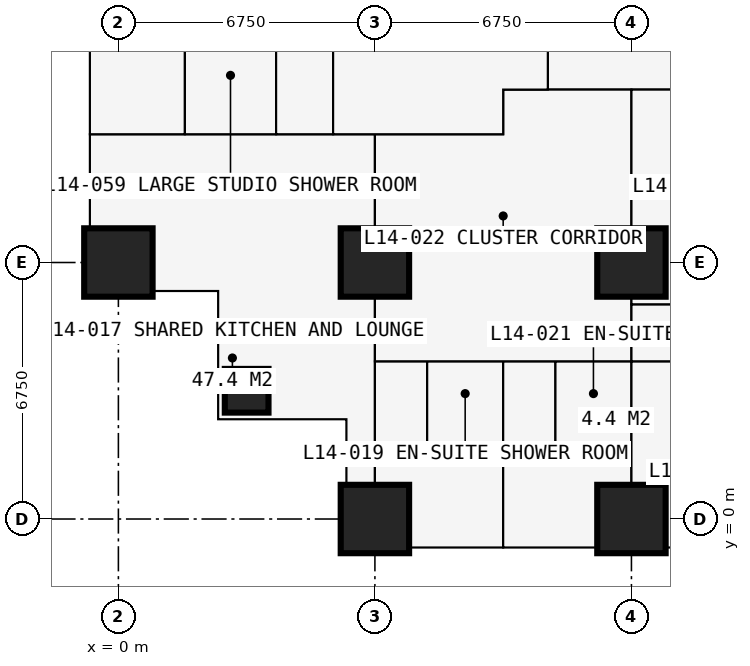
"""IFC4 building model, lengths in metres.
Left out: names, types, materials, properties, quantities, classifications, styles, units other than length and angle.
Written with IfcOpenShell. Run it as: python <this file> out.ifc"""

import sys

from ifc_helpers import new_model, si_unit, direction, frame, frame_2d, origin, origin_2d, place, context, subcontext, project, spatial, rectangle, extrude, element, fill, save


model = new_model("IFC4")
c1 = context("Model", 3, precision=1e-05, world=origin(), true_north=direction((0.0, 1.0)))
c2 = subcontext(c1, "Body", "Model", "MODEL_VIEW")
j1 = project(units=[si_unit("LENGTHUNIT", "METRE"), si_unit("PLANEANGLEUNIT", "RADIAN")], contexts=[c1])
p1 = place(None, origin())
s1 = spatial("IfcSite", under=j1, at=p1, CompositionType="ELEMENT")
p2 = place(p1, origin())
s2 = spatial("IfcBuilding", under=s1, at=p2, CompositionType="ELEMENT")
p3 = place(p2, frame((0.0, 0.0, 54.0)))
s3 = spatial("IfcBuildingStorey", under=s2, at=p3, CompositionType="ELEMENT", Elevation=54.0)
p4 = place(p3, frame((0.0, 6.75, 0.0), z_axis=(0.0, 0.0, 1.0), x_axis=(1.0, 0.0, 0.0)))
e1 = element("IfcColumn", 1, at=p4, inside=s3, PredefinedType="COLUMN", context=c2, shape_type="SweptSolid", body=[
    extrude(rectangle(XDim=1.8, YDim=1.8, at=origin_2d()), origin(), (0.0, 0.0, 1.0), 3.6),
])
p5 = place(p3, frame((3.375, 3.375, 0.0), z_axis=(0.0, 0.0, 1.0), x_axis=(1.0, 0.0, 0.0)))
e2 = element("IfcColumn", 2, at=p5, inside=s3, PredefinedType="COLUMN", context=c2, shape_type="SweptSolid", body=[
    extrude(rectangle(XDim=1.15, YDim=1.15, at=origin_2d()), origin(), (0.0, 0.0, 1.0), 3.6),
])
for number, where, z_axis, x_axis in (
    (3, (6.75, 0.0, 0.0), (0.0, 0.0, 1.0), (1.0, 0.0, 0.0)),
    (4, (6.75, 6.75, 0.0), (0.0, 0.0, 1.0), (1.0, 0.0, 0.0)),
    (5, (13.5, 0.0, 0.0), (0.0, 0.0, 1.0), (1.0, 0.0, 0.0)),
    (6, (13.5, 6.75, 0.0), (0.0, 0.0, 1.0), (1.0, 0.0, 0.0)),
):
    element("IfcColumn", number, at=place(p3, frame(where, z_axis=z_axis, x_axis=x_axis)), inside=s3, PredefinedType="COLUMN", context=c2, shape_type="SweptSolid", body=[
        extrude(rectangle(XDim=1.8, YDim=1.8, at=origin_2d()), origin(), (0.0, 0.0, 1.0), 3.6),
    ])
p6 = place(p3, frame((-0.75, 6.0, 0.0), z_axis=(0.0, 0.0, 1.0), x_axis=(1.0, 0.0, 0.0)))
e7 = element("IfcWall", 7, at=p6, inside=s3, PredefinedType="SOLIDWALL", context=c2, shape_type="SweptSolid", body=[
    extrude(rectangle(XDim=3.375, YDim=0.3, at=frame_2d((1.688, 0.0))), origin(), (0.0, 0.0, 1.0), 3.375),
])
p7 = place(p6, frame((1.833, 0.0, 0.9)))
e8 = element("IfcOpeningElement", 8, at=p7, cuts=e7, PredefinedType="OPENING", context=c2, shape_type="SweptSolid", body=[
    extrude(rectangle(XDim=1.2, YDim=1.8, at=frame_2d((0.6, 0.9))), frame((0.0, 0.16, 0.0), z_axis=(0.0, -1.0, 0.0), x_axis=(1.0, 0.0, 0.0)), (0.0, 0.0, 1.0), 0.32),
])
p8 = place(p3, frame((2.625, 6.0, 0.0), z_axis=(0.0, 0.0, 1.0), x_axis=(0.0, -1.0, 0.0)))
e9 = element("IfcWall", 9, at=p8, inside=s3, PredefinedType="SOLIDWALL", context=c2, shape_type="SweptSolid", body=[
    extrude(rectangle(XDim=3.375, YDim=0.3, at=frame_2d((1.688, 0.0))), origin(), (0.0, 0.0, 1.0), 3.375),
])
p9 = place(p8, frame((0.788, 0.0, 0.6)))
e10 = element("IfcOpeningElement", 10, at=p9, cuts=e9, PredefinedType="OPENING", context=c2, shape_type="SweptSolid", body=[
    extrude(rectangle(XDim=1.8, YDim=2.1, at=frame_2d((0.9, 1.05))), frame((0.0, 0.16, 0.0), z_axis=(0.0, -1.0, 0.0), x_axis=(1.0, 0.0, 0.0)), (0.0, 0.0, 1.0), 0.32),
])
p10 = place(p3, frame((2.625, 2.625, 0.0), z_axis=(0.0, 0.0, 1.0), x_axis=(1.0, 0.0, 0.0)))
e11 = element("IfcWall", 11, at=p10, inside=s3, PredefinedType="SOLIDWALL", context=c2, shape_type="SweptSolid", body=[
    extrude(rectangle(XDim=3.375, YDim=0.3, at=frame_2d((1.688, 0.0))), origin(), (0.0, 0.0, 1.0), 3.375),
])
p11 = place(p10, frame((0.788, 0.0, 0.6)))
e12 = element("IfcOpeningElement", 12, at=p11, cuts=e11, PredefinedType="OPENING", context=c2, shape_type="SweptSolid", body=[
    extrude(rectangle(XDim=1.8, YDim=2.1, at=frame_2d((0.9, 1.05))), frame((0.0, 0.16, 0.0), z_axis=(0.0, -1.0, 0.0), x_axis=(1.0, 0.0, 0.0)), (0.0, 0.0, 1.0), 0.32),
])
p12 = place(p3, frame((6.0, 2.625, 0.0), z_axis=(0.0, 0.0, 1.0), x_axis=(0.0, -1.0, 0.0)))
e13 = element("IfcWall", 13, at=p12, inside=s3, PredefinedType="SOLIDWALL", context=c2, shape_type="SweptSolid", body=[
    extrude(rectangle(XDim=3.375, YDim=0.3, at=frame_2d((1.688, 0.0))), origin(), (0.0, 0.0, 1.0), 3.375),
])
p13 = place(p12, frame((0.343, 0.0, 0.9)))
e14 = element("IfcOpeningElement", 14, at=p13, cuts=e13, PredefinedType="OPENING", context=c2, shape_type="SweptSolid", body=[
    extrude(rectangle(XDim=1.2, YDim=1.8, at=frame_2d((0.6, 0.9))), frame((0.0, 0.16, 0.0), z_axis=(0.0, -1.0, 0.0), x_axis=(1.0, 0.0, 0.0)), (0.0, 0.0, 1.0), 0.32),
])
p14 = place(p3, frame((20.25, -0.75, 0.0), z_axis=(0.0, 0.0, 1.0), x_axis=(-1.0, 0.0, 0.0)))
e15 = element("IfcWall", 15, at=p14, inside=s3, PredefinedType="SOLIDWALL", context=c2, shape_type="SweptSolid", body=[
    extrude(rectangle(XDim=6.75, YDim=0.15, at=frame_2d((3.375, 0.0))), origin(), (0.0, 0.0, 1.0), 3.375),
])
p15 = place(p14, frame((0.962, 0.0, 0.0)))
e16 = element("IfcOpeningElement", 16, at=p15, cuts=e15, PredefinedType="OPENING", context=c2, shape_type="SweptSolid", body=[
    extrude(rectangle(XDim=1.0, YDim=2.2, at=frame_2d((0.5, 1.1))), frame((0.0, 0.085, 0.0), z_axis=(0.0, -1.0, 0.0), x_axis=(1.0, 0.0, 0.0)), (0.0, 0.0, 1.0), 0.17),
])
p16 = place(p14, frame((2.025, 0.0, 0.9)))
e17 = element("IfcOpeningElement", 17, at=p16, cuts=e15, PredefinedType="OPENING", context=c2, shape_type="SweptSolid", body=[
    extrude(rectangle(XDim=1.2, YDim=1.8, at=frame_2d((0.6, 0.9))), frame((0.0, 0.085, 0.0), z_axis=(0.0, -1.0, 0.0), x_axis=(1.0, 0.0, 0.0)), (0.0, 0.0, 1.0), 0.17),
])
p17 = place(p14, frame((4.788, 0.0, 0.0)))
e18 = element("IfcOpeningElement", 18, at=p17, cuts=e15, PredefinedType="OPENING", context=c2, shape_type="SweptSolid", body=[
    extrude(rectangle(XDim=1.0, YDim=2.2, at=frame_2d((0.5, 1.1))), frame((0.0, 0.085, 0.0), z_axis=(0.0, -1.0, 0.0), x_axis=(1.0, 0.0, 0.0)), (0.0, 0.0, 1.0), 0.17),
])
p18 = place(p14, frame((3.525, 0.0, 0.9)))
e19 = element("IfcOpeningElement", 19, at=p18, cuts=e15, PredefinedType="OPENING", context=c2, shape_type="SweptSolid", body=[
    extrude(rectangle(XDim=1.2, YDim=1.8, at=frame_2d((0.6, 0.9))), frame((0.0, 0.085, 0.0), z_axis=(0.0, -1.0, 0.0), x_axis=(1.0, 0.0, 0.0)), (0.0, 0.0, 1.0), 0.17),
])
p19 = place(p3, frame((-0.734, 10.125, 0.0), z_axis=(0.0, 0.0, 1.0), x_axis=(1.0, 0.0, 0.0)))
e20 = element("IfcWall", 20, at=p19, inside=s3, PredefinedType="PARTITIONING", context=c2, shape_type="SweptSolid", body=[
    extrude(rectangle(XDim=10.859, YDim=0.15, at=frame_2d((5.429, 0.0))), origin(), (0.0, 0.0, 1.0), 3.375),
])
p20 = place(p19, frame((5.134, 0.0, 0.0)))
e21 = element("IfcOpeningElement", 21, at=p20, cuts=e20, PredefinedType="OPENING", context=c2, shape_type="SweptSolid", body=[
    extrude(rectangle(XDim=1.0, YDim=2.2, at=frame_2d((0.5, 1.1))), frame((0.0, 0.085, 0.0), z_axis=(0.0, -1.0, 0.0), x_axis=(1.0, 0.0, 0.0)), (0.0, 0.0, 1.0), 0.17),
])
p21 = place(p3, frame((1.75, 10.125, 0.0), z_axis=(0.0, 0.0, 1.0), x_axis=(0.0, 1.0, 0.0)))
e22 = element("IfcWall", 22, at=p21, inside=s3, PredefinedType="PARTITIONING", context=c2, shape_type="SweptSolid", body=[
    extrude(rectangle(XDim=2.6, YDim=0.1, at=frame_2d((1.3, 0.0))), origin(), (0.0, 0.0, 1.0), 3.375),
])
p22 = place(p21, frame((0.85, 0.0, 0.0)))
e23 = element("IfcOpeningElement", 23, at=p22, cuts=e22, PredefinedType="OPENING", context=c2, shape_type="SweptSolid", body=[
    extrude(rectangle(XDim=0.9, YDim=2.2, at=frame_2d((0.45, 1.1))), frame((0.0, 0.06, 0.0), z_axis=(0.0, -1.0, 0.0), x_axis=(1.0, 0.0, 0.0)), (0.0, 0.0, 1.0), 0.12),
])
p23 = place(p3, frame((4.15, 10.125, 0.0), z_axis=(0.0, 0.0, 1.0), x_axis=(0.0, 1.0, 0.0)))
e24 = element("IfcWall", 24, at=p23, inside=s3, PredefinedType="PARTITIONING", context=c2, shape_type="SweptSolid", body=[
    extrude(rectangle(XDim=23.625, YDim=0.15, at=frame_2d((11.812, 0.0))), origin(), (0.0, 0.0, 1.0), 3.375),
])
p24 = place(p23, frame((4.2, 0.0, 0.0)))
e25 = element("IfcOpeningElement", 25, at=p24, cuts=e24, PredefinedType="OPENING", context=c2, shape_type="SweptSolid", body=[
    extrude(rectangle(XDim=0.95, YDim=2.2, at=frame_2d((0.475, 1.1))), frame((0.0, 0.085, 0.0), z_axis=(0.0, -1.0, 0.0), x_axis=(1.0, 0.0, 0.0)), (0.0, 0.0, 1.0), 0.17),
])
p25 = place(p23, frame((10.95, 0.0, 0.0)))
e26 = element("IfcOpeningElement", 26, at=p25, cuts=e24, PredefinedType="OPENING", context=c2, shape_type="SweptSolid", body=[
    extrude(rectangle(XDim=0.95, YDim=2.2, at=frame_2d((0.475, 1.1))), frame((0.0, 0.085, 0.0), z_axis=(0.0, -1.0, 0.0), x_axis=(1.0, 0.0, 0.0)), (0.0, 0.0, 1.0), 0.17),
])
p26 = place(p23, frame((17.7, 0.0, 0.0)))
e27 = element("IfcOpeningElement", 27, at=p26, cuts=e24, PredefinedType="OPENING", context=c2, shape_type="SweptSolid", body=[
    extrude(rectangle(XDim=0.95, YDim=2.2, at=frame_2d((0.475, 1.1))), frame((0.0, 0.085, 0.0), z_axis=(0.0, -1.0, 0.0), x_axis=(1.0, 0.0, 0.0)), (0.0, 0.0, 1.0), 0.17),
])
p27 = place(p3, frame((5.65, 10.125, 0.0), z_axis=(0.0, 0.0, 1.0), x_axis=(0.0, 1.0, 0.0)))
e28 = element("IfcWall", 28, at=p27, inside=s3, PredefinedType="PARTITIONING", context=c2, shape_type="SweptSolid", body=[
    extrude(rectangle(XDim=10.762, YDim=0.15, at=frame_2d((5.381, 0.0))), origin(), (0.0, 0.0, 1.0), 3.375),
])
p28 = place(p27, frame((4.9, 0.0, 0.0)))
e29 = element("IfcOpeningElement", 29, at=p28, cuts=e28, PredefinedType="OPENING", context=c2, shape_type="SweptSolid", body=[
    extrude(rectangle(XDim=0.95, YDim=2.2, at=frame_2d((0.475, 1.1))), frame((0.0, 0.085, 0.0), z_axis=(0.0, -1.0, 0.0), x_axis=(1.0, 0.0, 0.0)), (0.0, 0.0, 1.0), 0.17),
])
p29 = place(p3, frame((6.75, -0.734, 0.0), z_axis=(0.0, 0.0, 1.0), x_axis=(0.0, 1.0, 0.0)))
e30 = element("IfcWall", 30, at=p29, inside=s3, PredefinedType="PARTITIONING", context=c2, shape_type="SweptSolid", body=[
    extrude(rectangle(XDim=10.859, YDim=0.15, at=frame_2d((5.429, 0.0))), origin(), (0.0, 0.0, 1.0), 2.877),
])
p30 = place(p3, frame((6.75, 4.15, 0.0), z_axis=(0.0, 0.0, 1.0), x_axis=(1.0, 0.0, 0.0)))
e31 = element("IfcWall", 31, at=p30, inside=s3, PredefinedType="PARTITIONING", context=c2, shape_type="SweptSolid", body=[
    extrude(rectangle(XDim=23.625, YDim=0.15, at=frame_2d((11.812, 0.0))), origin(), (0.0, 0.0, 1.0), 3.375),
])
p31 = place(p30, frame((0.2, 0.0, 0.0)))
e32 = element("IfcOpeningElement", 32, at=p31, cuts=e31, PredefinedType="OPENING", context=c2, shape_type="SweptSolid", body=[
    extrude(rectangle(XDim=0.95, YDim=2.2, at=frame_2d((0.475, 1.1))), frame((0.0, 0.085, 0.0), z_axis=(0.0, -1.0, 0.0), x_axis=(1.0, 0.0, 0.0)), (0.0, 0.0, 1.0), 0.17),
])
p32 = place(p30, frame((3.625, 0.0, 0.0)))
e33 = element("IfcOpeningElement", 33, at=p32, cuts=e31, PredefinedType="OPENING", context=c2, shape_type="SweptSolid", body=[
    extrude(rectangle(XDim=0.95, YDim=2.2, at=frame_2d((0.475, 1.1))), frame((0.0, 0.085, 0.0), z_axis=(0.0, -1.0, 0.0), x_axis=(1.0, 0.0, 0.0)), (0.0, 0.0, 1.0), 0.17),
])
p33 = place(p30, frame((18.475, 0.0, 0.0)))
e34 = element("IfcOpeningElement", 34, at=p33, cuts=e31, PredefinedType="OPENING", context=c2, shape_type="SweptSolid", body=[
    extrude(rectangle(XDim=0.95, YDim=2.2, at=frame_2d((0.475, 1.1))), frame((0.0, 0.085, 0.0), z_axis=(0.0, -1.0, 0.0), x_axis=(1.0, 0.0, 0.0)), (0.0, 0.0, 1.0), 0.17),
])
p34 = place(p30, frame((11.725, 0.0, 0.0)))
e35 = element("IfcOpeningElement", 35, at=p34, cuts=e31, PredefinedType="OPENING", context=c2, shape_type="SweptSolid", body=[
    extrude(rectangle(XDim=0.95, YDim=2.2, at=frame_2d((0.475, 1.1))), frame((0.0, 0.085, 0.0), z_axis=(0.0, -1.0, 0.0), x_axis=(1.0, 0.0, 0.0)), (0.0, 0.0, 1.0), 0.17),
])
p35 = place(p30, frame((6.95, 0.0, 0.0)))
e36 = element("IfcOpeningElement", 36, at=p35, cuts=e31, PredefinedType="OPENING", context=c2, shape_type="SweptSolid", body=[
    extrude(rectangle(XDim=0.95, YDim=2.2, at=frame_2d((0.475, 1.1))), frame((0.0, 0.085, 0.0), z_axis=(0.0, -1.0, 0.0), x_axis=(1.0, 0.0, 0.0)), (0.0, 0.0, 1.0), 0.17),
])
p36 = place(p3, frame((8.125, 1.95, 0.0), z_axis=(0.0, 0.0, 1.0), x_axis=(0.0, 1.0, 0.0)))
e37 = element("IfcWall", 37, at=p36, inside=s3, PredefinedType="PARTITIONING", context=c2, shape_type="SweptSolid", body=[
    extrude(rectangle(XDim=2.2, YDim=0.1, at=frame_2d((1.1, 0.0))), origin(), (0.0, 0.0, 1.0), 3.375),
])
p37 = place(p36, frame((0.65, 0.0, 0.0)))
e38 = element("IfcOpeningElement", 38, at=p37, cuts=e37, PredefinedType="OPENING", context=c2, shape_type="SweptSolid", body=[
    extrude(rectangle(XDim=0.9, YDim=2.2, at=frame_2d((0.45, 1.1))), frame((0.0, 0.06, 0.0), z_axis=(0.0, -1.0, 0.0), x_axis=(1.0, 0.0, 0.0)), (0.0, 0.0, 1.0), 0.12),
])
p38 = place(p3, frame((8.125, 1.95, 0.0), z_axis=(0.0, 0.0, 1.0), x_axis=(1.0, 0.0, 0.0)))
e39 = element("IfcWall", 39, at=p38, inside=s3, PredefinedType="PARTITIONING", context=c2, shape_type="SweptSolid", body=[
    extrude(rectangle(XDim=2.0, YDim=0.1, at=frame_2d((1.0, 0.0))), origin(), (0.0, 0.0, 1.0), 3.375),
])
p39 = place(p3, frame((10.125, -0.734, 0.0), z_axis=(0.0, 0.0, 1.0), x_axis=(0.0, 1.0, 0.0)))
e40 = element("IfcWall", 40, at=p39, inside=s3, PredefinedType="PARTITIONING", context=c2, shape_type="SweptSolid", body=[
    extrude(rectangle(XDim=4.884, YDim=0.175, at=frame_2d((2.442, 0.0))), origin(), (0.0, 0.0, 1.0), 3.375),
])
p40 = place(p3, frame((10.125, 10.125, 0.0), z_axis=(0.0, 0.0, 1.0), x_axis=(0.0, 1.0, 0.0)))
e41 = element("IfcWall", 41, at=p40, inside=s3, PredefinedType="PARTITIONING", context=c2, shape_type="SweptSolid", body=[
    extrude(rectangle(XDim=1.175, YDim=0.15, at=frame_2d((0.587, 0.0))), origin(), (0.0, 0.0, 1.0), 3.375),
])
p41 = place(p3, frame((10.125, 11.3, 0.0), z_axis=(0.0, 0.0, 1.0), x_axis=(1.0, 0.0, 0.0)))
e42 = element("IfcWall", 42, at=p41, inside=s3, PredefinedType="PARTITIONING", context=c2, shape_type="SweptSolid", body=[
    extrude(rectangle(XDim=20.675, YDim=0.15, at=frame_2d((10.337, 0.0))), origin(), (0.0, 0.0, 1.0), 3.375),
])
p42 = place(p41, frame((1.775, 0.0, 0.0)))
e43 = element("IfcOpeningElement", 43, at=p42, cuts=e42, PredefinedType="OPENING", context=c2, shape_type="SweptSolid", body=[
    extrude(rectangle(XDim=1.0, YDim=2.2, at=frame_2d((0.5, 1.1))), frame((0.0, 0.085, 0.0), z_axis=(0.0, -1.0, 0.0), x_axis=(1.0, 0.0, 0.0)), (0.0, 0.0, 1.0), 0.17),
])
p43 = place(p41, frame((11.312, 0.0, 0.0)))
e44 = element("IfcOpeningElement", 44, at=p43, cuts=e42, PredefinedType="OPENING", context=c2, shape_type="SweptSolid", body=[
    extrude(rectangle(XDim=1.0, YDim=2.2, at=frame_2d((0.5, 1.1))), frame((0.0, 0.085, 0.0), z_axis=(0.0, -1.0, 0.0), x_axis=(1.0, 0.0, 0.0)), (0.0, 0.0, 1.0), 0.17),
])
p44 = place(p3, frame((11.3, 11.3, 0.0), z_axis=(0.0, 0.0, 1.0), x_axis=(0.0, 1.0, 0.0)))
e45 = element("IfcWall", 45, at=p44, inside=s3, PredefinedType="PARTITIONING", context=c2, shape_type="SweptSolid", body=[
    extrude(rectangle(XDim=19.075, YDim=0.15, at=frame_2d((9.538, 0.0))), origin(), (0.0, 0.0, 1.0), 3.375),
])
p45 = place(p44, frame((10.137, 0.0, 0.0)))
e46 = element("IfcOpeningElement", 46, at=p45, cuts=e45, PredefinedType="OPENING", context=c2, shape_type="SweptSolid", body=[
    extrude(rectangle(XDim=1.0, YDim=2.2, at=frame_2d((0.5, 1.1))), frame((0.0, 0.085, 0.0), z_axis=(0.0, -1.0, 0.0), x_axis=(1.0, 0.0, 0.0)), (0.0, 0.0, 1.0), 0.17),
])
p46 = place(p3, frame((11.5, 1.95, 0.0), z_axis=(0.0, 0.0, 1.0), x_axis=(0.0, 1.0, 0.0)))
e47 = element("IfcWall", 47, at=p46, inside=s3, PredefinedType="PARTITIONING", context=c2, shape_type="SweptSolid", body=[
    extrude(rectangle(XDim=2.2, YDim=0.1, at=frame_2d((1.1, 0.0))), origin(), (0.0, 0.0, 1.0), 3.375),
])
p47 = place(p46, frame((0.65, 0.0, 0.0)))
e48 = element("IfcOpeningElement", 48, at=p47, cuts=e47, PredefinedType="OPENING", context=c2, shape_type="SweptSolid", body=[
    extrude(rectangle(XDim=0.9, YDim=2.2, at=frame_2d((0.45, 1.1))), frame((0.0, 0.06, 0.0), z_axis=(0.0, -1.0, 0.0), x_axis=(1.0, 0.0, 0.0)), (0.0, 0.0, 1.0), 0.12),
])
p48 = place(p3, frame((11.5, 1.95, 0.0), z_axis=(0.0, 0.0, 1.0), x_axis=(1.0, 0.0, 0.0)))
e49 = element("IfcWall", 49, at=p48, inside=s3, PredefinedType="PARTITIONING", context=c2, shape_type="SweptSolid", body=[
    extrude(rectangle(XDim=2.0, YDim=0.1, at=frame_2d((1.0, 0.0))), origin(), (0.0, 0.0, 1.0), 3.375),
])
p49 = place(p3, frame((13.5, -0.734, 0.0), z_axis=(0.0, 0.0, 1.0), x_axis=(0.0, 1.0, 0.0)))
e50 = element("IfcWall", 50, at=p49, inside=s3, PredefinedType="PARTITIONING", context=c2, shape_type="SweptSolid", body=[
    extrude(rectangle(XDim=12.034, YDim=0.15, at=frame_2d((6.017, 0.0))), origin(), (0.0, 0.0, 1.0), 2.877),
])
p50 = place(p3, frame((13.5, 5.65, 0.0), z_axis=(0.0, 0.0, 1.0), x_axis=(1.0, 0.0, 0.0)))
e51 = element("IfcWall", 51, at=p50, inside=s3, PredefinedType="PARTITIONING", context=c2, shape_type="SweptSolid", body=[
    extrude(rectangle(XDim=7.387, YDim=0.15, at=frame_2d((3.694, 0.0))), origin(), (0.0, 0.0, 1.0), 3.375),
])
p51 = place(p50, frame((3.2, 0.0, 0.0)))
e52 = element("IfcOpeningElement", 52, at=p51, cuts=e51, PredefinedType="OPENING", context=c2, shape_type="SweptSolid", body=[
    extrude(rectangle(XDim=0.95, YDim=2.2, at=frame_2d((0.475, 1.1))), frame((0.0, 0.085, 0.0), z_axis=(0.0, -1.0, 0.0), x_axis=(1.0, 0.0, 0.0)), (0.0, 0.0, 1.0), 0.17),
])
p52 = place(p7, origin())
e53 = element("IfcWindow", 53, at=p52, inside=s3, PartitioningType="SINGLE_PANEL", PredefinedType="WINDOW", context=c2, shape_type="SweptSolid", body=[
    extrude(rectangle(XDim=1.2, YDim=1.8, at=frame_2d((0.6, 0.9))), frame((0.0, 0.03, 0.0), z_axis=(0.0, -1.0, 0.0), x_axis=(1.0, 0.0, 0.0)), (0.0, 0.0, 1.0), 0.06),
])
fill(e8, e53)
p53 = place(p9, origin())
e54 = element("IfcWindow", 54, at=p53, inside=s3, PartitioningType="SINGLE_PANEL", PredefinedType="WINDOW", context=c2, shape_type="SweptSolid", body=[
    extrude(rectangle(XDim=1.8, YDim=2.1, at=frame_2d((0.9, 1.05))), frame((0.0, 0.03, 0.0), z_axis=(0.0, -1.0, 0.0), x_axis=(1.0, 0.0, 0.0)), (0.0, 0.0, 1.0), 0.06),
])
fill(e10, e54)
p54 = place(p11, origin())
e55 = element("IfcWindow", 55, at=p54, inside=s3, PartitioningType="SINGLE_PANEL", PredefinedType="WINDOW", context=c2, shape_type="SweptSolid", body=[
    extrude(rectangle(XDim=1.8, YDim=2.1, at=frame_2d((0.9, 1.05))), frame((0.0, 0.03, 0.0), z_axis=(0.0, -1.0, 0.0), x_axis=(1.0, 0.0, 0.0)), (0.0, 0.0, 1.0), 0.06),
])
fill(e12, e55)
p55 = place(p13, origin())
e56 = element("IfcWindow", 56, at=p55, inside=s3, PartitioningType="SINGLE_PANEL", PredefinedType="WINDOW", context=c2, shape_type="SweptSolid", body=[
    extrude(rectangle(XDim=1.2, YDim=1.8, at=frame_2d((0.6, 0.9))), frame((0.0, 0.03, 0.0), z_axis=(0.0, -1.0, 0.0), x_axis=(1.0, 0.0, 0.0)), (0.0, 0.0, 1.0), 0.06),
])
fill(e14, e56)
p56 = place(p17, origin())
e57 = element("IfcDoor", 57, at=p56, inside=s3, OperationType="SINGLE_SWING_RIGHT", PredefinedType="DOOR", context=c2, shape_type="SweptSolid", body=[
    extrude(rectangle(XDim=1.0, YDim=2.2, at=frame_2d((0.5, 1.1))), frame((0.0, 0.025, 0.0), z_axis=(0.0, -1.0, 0.0), x_axis=(1.0, 0.0, 0.0)), (0.0, 0.0, 1.0), 0.05),
])
fill(e18, e57)
p57 = place(p20, origin())
e58 = element("IfcDoor", 58, at=p57, inside=s3, OperationType="SINGLE_SWING_LEFT", PredefinedType="DOOR", context=c2, shape_type="SweptSolid", body=[
    extrude(rectangle(XDim=1.0, YDim=2.2, at=frame_2d((0.5, 1.1))), frame((0.0, 0.025, 0.0), z_axis=(0.0, -1.0, 0.0), x_axis=(1.0, 0.0, 0.0)), (0.0, 0.0, 1.0), 0.05),
])
fill(e21, e58)
p58 = place(p31, origin())
e59 = element("IfcDoor", 59, at=p58, inside=s3, OperationType="SINGLE_SWING_LEFT", PredefinedType="DOOR", context=c2, shape_type="SweptSolid", body=[
    extrude(rectangle(XDim=0.95, YDim=2.2, at=frame_2d((0.475, 1.1))), frame((0.0, 0.025, 0.0), z_axis=(0.0, -1.0, 0.0), x_axis=(1.0, 0.0, 0.0)), (0.0, 0.0, 1.0), 0.05),
])
fill(e32, e59)
p59 = place(p37, origin())
e60 = element("IfcDoor", 60, at=p59, inside=s3, OperationType="SINGLE_SWING_RIGHT", PredefinedType="DOOR", context=c2, shape_type="SweptSolid", body=[
    extrude(rectangle(XDim=0.9, YDim=2.2, at=frame_2d((0.45, 1.1))), frame((0.0, 0.025, 0.0), z_axis=(0.0, -1.0, 0.0), x_axis=(1.0, 0.0, 0.0)), (0.0, 0.0, 1.0), 0.05),
])
fill(e38, e60)
p60 = place(p32, origin())
e61 = element("IfcDoor", 61, at=p60, inside=s3, OperationType="SINGLE_SWING_LEFT", PredefinedType="DOOR", context=c2, shape_type="SweptSolid", body=[
    extrude(rectangle(XDim=0.95, YDim=2.2, at=frame_2d((0.475, 1.1))), frame((0.0, 0.025, 0.0), z_axis=(0.0, -1.0, 0.0), x_axis=(1.0, 0.0, 0.0)), (0.0, 0.0, 1.0), 0.05),
])
fill(e33, e61)
p61 = place(p47, origin())
e62 = element("IfcDoor", 62, at=p61, inside=s3, OperationType="SINGLE_SWING_RIGHT", PredefinedType="DOOR", context=c2, shape_type="SweptSolid", body=[
    extrude(rectangle(XDim=0.9, YDim=2.2, at=frame_2d((0.45, 1.1))), frame((0.0, 0.025, 0.0), z_axis=(0.0, -1.0, 0.0), x_axis=(1.0, 0.0, 0.0)), (0.0, 0.0, 1.0), 0.05),
])
fill(e48, e62)
p62 = place(p42, origin())
e63 = element("IfcDoor", 63, at=p62, inside=s3, OperationType="SINGLE_SWING_LEFT", PredefinedType="DOOR", context=c2, shape_type="SweptSolid", body=[
    extrude(rectangle(XDim=1.0, YDim=2.2, at=frame_2d((0.5, 1.1))), frame((0.0, 0.025, 0.0), z_axis=(0.0, -1.0, 0.0), x_axis=(1.0, 0.0, 0.0)), (0.0, 0.0, 1.0), 0.05),
])
fill(e43, e63)
p63 = place(p35, origin())
e64 = element("IfcDoor", 64, at=p63, inside=s3, OperationType="SINGLE_SWING_LEFT", PredefinedType="DOOR", context=c2, shape_type="SweptSolid", body=[
    extrude(rectangle(XDim=0.95, YDim=2.2, at=frame_2d((0.475, 1.1))), frame((0.0, 0.025, 0.0), z_axis=(0.0, -1.0, 0.0), x_axis=(1.0, 0.0, 0.0)), (0.0, 0.0, 1.0), 0.05),
])
fill(e36, e64)
p64 = place(p22, origin())
e65 = element("IfcDoor", 65, at=p64, inside=s3, OperationType="SINGLE_SWING_RIGHT", PredefinedType="DOOR", context=c2, shape_type="SweptSolid", body=[
    extrude(rectangle(XDim=0.9, YDim=2.2, at=frame_2d((0.45, 1.1))), frame((0.0, 0.025, 0.0), z_axis=(0.0, -1.0, 0.0), x_axis=(1.0, 0.0, 0.0)), (0.0, 0.0, 1.0), 0.05),
])
fill(e23, e65)
save(model, sys.argv[1])
